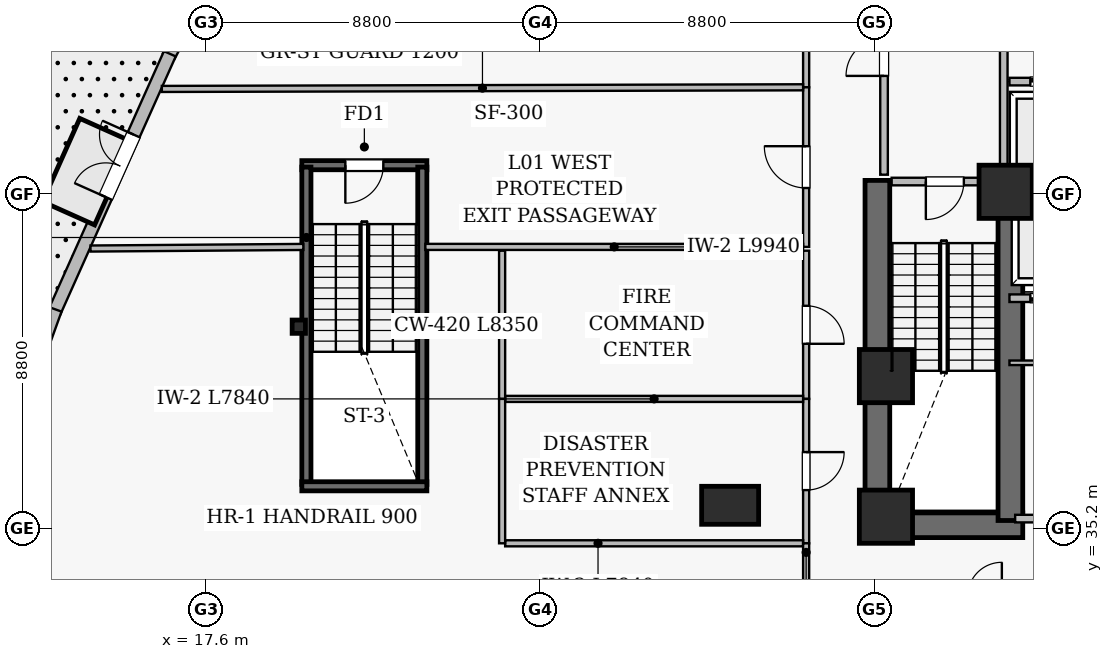
"""IFC4 building model, lengths in metres.
Left out: names, types, materials, properties, quantities, classifications, styles, units other than length and angle.
Written with IfcOpenShell. Run it as: python <this file> out.ifc"""

import sys

from ifc_helpers import new_model, si_unit, direction, frame, frame_2d, origin, origin_2d, place, context, subcontext, project, spatial, rectangle, i_section, extrude, element, fill, save


model = new_model("IFC4")
c1 = context("Model", 3, precision=1e-05, world=origin(), true_north=direction((0.0, 1.0)))
c2 = subcontext(c1, "Body", "Model", "MODEL_VIEW")
j1 = project(units=[si_unit("LENGTHUNIT", "METRE"), si_unit("PLANEANGLEUNIT", "RADIAN")], contexts=[c1])
p1 = place(None, origin())
s1 = spatial("IfcSite", under=j1, at=p1, CompositionType="ELEMENT")
p2 = place(p1, origin())
s2 = spatial("IfcBuilding", under=s1, at=p2, CompositionType="ELEMENT")
p3 = place(p2, origin())
s3 = spatial("IfcBuildingStorey", under=s2, at=p3, CompositionType="ELEMENT", Elevation=0.0)
p4 = place(p3, frame((34.95, 35.275, 0.0), z_axis=(0.0, 0.0, 1.0), x_axis=(1.0, 0.0, 0.0)))
e1 = element("IfcWall", 1, at=p4, inside=s3, PredefinedType="SHEAR", context=c2, shape_type="SweptSolid", body=[
    extrude(rectangle(XDim=4.15, YDim=0.65, at=frame_2d((2.075, 0.0))), origin(), (0.0, 0.0, 1.0), 4.5),
])
p5 = place(p3, frame((35.275, 34.95, 0.0), z_axis=(0.0, 0.0, 1.0), x_axis=(0.0, 1.0, 0.0)))
e2 = element("IfcWall", 2, at=p5, inside=s3, PredefinedType="SHEAR", context=c2, shape_type="SweptSolid", body=[
    extrude(rectangle(XDim=9.4, YDim=0.65, at=frame_2d((4.7, 0.0))), origin(), (0.0, 0.0, 1.0), 4.5),
])
p6 = place(p3, frame((38.775, 35.4, 0.0), z_axis=(0.0, 0.0, 1.0), x_axis=(0.0, 1.0, 0.0)))
e3 = element("IfcWall", 3, at=p6, inside=s3, PredefinedType="SHEAR", context=c2, shape_type="SweptSolid", body=[
    extrude(rectangle(XDim=8.95, YDim=0.65, at=frame_2d((4.475, 0.0))), origin(), (0.0, 0.0, 1.0), 4.5),
])
p7 = place(p3, frame((38.75, 44.05, 0.0), z_axis=(0.0, 0.0, 1.0), x_axis=(1.0, 0.0, 0.0)))
e4 = element("IfcWall", 4, at=p7, inside=s3, PredefinedType="SHEAR", context=c2, shape_type="SweptSolid", body=[
    extrude(rectangle(XDim=4.2, YDim=0.4, at=frame_2d((2.1, 0.0))), origin(), (0.0, 0.0, 1.0), 4.5),
])
for number, where, z_axis, x_axis in (
    (5, (35.5, 35.5, 0.0), (0.0, 0.0, 1.0), (1.0, 0.0, 0.0)),
    (6, (38.65, 44.05, 0.0), (0.0, 0.0, 1.0), (1.0, 0.0, 0.0)),
    (7, (35.5, 39.2, 0.0), (0.0, 0.0, 1.0), (1.0, 0.0, 0.0)),
):
    element("IfcColumn", number, at=place(p3, frame(where, z_axis=z_axis, x_axis=x_axis)), inside=s3, PredefinedType="COLUMN", context=c2, shape_type="SweptSolid", body=[
        extrude(rectangle(XDim=1.4, YDim=1.4, at=origin_2d()), origin(), (0.0, 0.0, 1.0), 4.8),
    ])
p8 = place(p3, frame((31.4, 35.8, 0.0), z_axis=(0.0, 0.0, 1.0), x_axis=(1.0, 0.0, 0.0)))
e8 = element("IfcColumn", 8, at=p8, inside=s3, PredefinedType="COLUMN", context=c2, shape_type="SweptSolid", body=[
    extrude(rectangle(XDim=1.5, YDim=1.0, at=origin_2d()), origin(), (0.0, 0.0, 1.0), 4.8),
])
p9 = place(p3, frame((20.05, 40.5, 0.0), z_axis=(0.0, 0.0, 1.0), x_axis=(1.0, 0.0, 0.0)))
e9 = element("IfcColumn", 9, at=p9, inside=s3, PredefinedType="PILASTER", context=c2, shape_type="SweptSolid", body=[
    extrude(i_section(OverallWidth=0.35, OverallDepth=0.35, WebThickness=0.012, FlangeThickness=0.019, FilletRadius=0.02, at=origin_2d()), origin(), (0.0, 0.0, 1.0), 4.8),
])
p10 = place(p3, frame((16.96, 48.239, 0.0), z_axis=(0.0, 0.0, 1.0), x_axis=(-0.474987965168, -0.879992291413, 0.0)))
e10 = element("IfcWall", 10, at=p10, inside=s3, PredefinedType="SOLIDWALL", context=c2, shape_type="SweptSolid", body=[
    extrude(rectangle(XDim=0.705, YDim=0.34, at=frame_2d((0.352, 0.0))), origin(), (0.0, 0.0, 1.0), 4.5),
])
p11 = place(p3, frame((16.656, 47.682, 0.0), z_axis=(0.0, 0.0, 1.0), x_axis=(-0.408068113154, -0.912951485582, 0.0)))
e11 = element("IfcWall", 11, at=p11, inside=s3, PredefinedType="SOLIDWALL", context=c2, shape_type="SweptSolid", body=[
    extrude(rectangle(XDim=7.439, YDim=0.34, at=frame_2d((3.719, 0.0))), origin(), (0.0, 0.0, 1.0), 4.5),
])
p12 = place(p11, frame((2.33, 0.0, 0.0)))
e12 = element("IfcOpeningElement", 12, at=p12, cuts=e11, PredefinedType="OPENING", context=c2, shape_type="SweptSolid", body=[
    extrude(rectangle(XDim=1.8, YDim=2.25, at=frame_2d((0.9, 1.125))), frame((0.0, 0.18, 0.0), z_axis=(0.0, -1.0, 0.0), x_axis=(1.0, 0.0, 0.0)), (0.0, 0.0, 1.0), 0.36),
])
p13 = place(p3, frame((13.647, 40.955, 0.0), z_axis=(0.0, 0.0, 1.0), x_axis=(-0.340123865441, -0.940380644291, 0.0)))
e13 = element("IfcWall", 13, at=p13, inside=s3, PredefinedType="SOLIDWALL", context=c2, shape_type="SweptSolid", body=[
    extrude(rectangle(XDim=7.52, YDim=0.34, at=frame_2d((3.76, 0.0))), origin(), (0.0, 0.0, 1.0), 4.5),
])
p14 = place(p13, frame((2.86, 0.0, 0.0)))
e14 = element("IfcOpeningElement", 14, at=p14, cuts=e13, PredefinedType="OPENING", context=c2, shape_type="SweptSolid", body=[
    extrude(rectangle(XDim=1.8, YDim=2.25, at=frame_2d((0.9, 1.125))), frame((0.0, 0.18, 0.0), z_axis=(0.0, -1.0, 0.0), x_axis=(1.0, 0.0, 0.0)), (0.0, 0.0, 1.0), 0.36),
])
p15 = place(p3, frame((20.13, 44.75, 0.0), z_axis=(0.0, 0.0, 1.0), x_axis=(1.0, 0.0, 0.0)))
e15 = element("IfcWall", 15, at=p15, inside=s3, PredefinedType="SHEAR", context=c2, shape_type="SweptSolid", body=[
    extrude(rectangle(XDim=3.29, YDim=0.24, at=frame_2d((1.645, 0.0))), origin(), (0.0, 0.0, 1.0), 4.5),
])
p16 = place(p15, frame((1.145, 0.0, 0.0)))
e16 = element("IfcOpeningElement", 16, at=p16, cuts=e15, PredefinedType="OPENING", context=c2, shape_type="SweptSolid", body=[
    extrude(rectangle(XDim=1.0, YDim=2.15, at=frame_2d((0.5, 1.075))), frame((0.0, 0.13, 0.0), z_axis=(0.0, -1.0, 0.0), x_axis=(1.0, 0.0, 0.0)), (0.0, 0.0, 1.0), 0.26),
])
for number, where, z_axis, x_axis in (
    (17, (20.25, 36.35, 0.0), (0.0, 0.0, 1.0), (0.0, 1.0, 0.0)),
    (18, (23.3, 36.35, 0.0), (0.0, 0.0, 1.0), (0.0, 1.0, 0.0)),
):
    element("IfcWall", number, at=place(p3, frame(where, z_axis=z_axis, x_axis=x_axis)), inside=s3, PredefinedType="SHEAR", context=c2, shape_type="SweptSolid", body=[
        extrude(rectangle(XDim=8.35, YDim=0.24, at=frame_2d((4.175, 0.0))), origin(), (0.0, 0.0, 1.0), 4.5),
    ])
p17 = place(p3, frame((20.13, 36.3, 0.0), z_axis=(0.0, 0.0, 1.0), x_axis=(1.0, 0.0, 0.0)))
e19 = element("IfcWall", 19, at=p17, inside=s3, PredefinedType="SHEAR", context=c2, shape_type="SweptSolid", body=[
    extrude(rectangle(XDim=3.29, YDim=0.24, at=frame_2d((1.645, 0.0))), origin(), (0.0, 0.0, 1.0), 4.5),
])
p18 = place(p3, frame((38.9, 35.45, 0.0), z_axis=(0.0, 0.0, 1.0), x_axis=(1.0, 0.0, 0.0)))
e20 = element("IfcWall", 20, at=p18, inside=s3, PredefinedType="SOLIDWALL", context=c2, shape_type="SweptSolid", body=[
    extrude(rectangle(XDim=10.2, YDim=0.2, at=frame_2d((5.1, 0.0))), origin(), (0.0, 0.0, 1.0), 4.5),
])
p19 = place(p18, frame((4.6, 0.0, 0.0)))
e21 = element("IfcOpeningElement", 21, at=p19, cuts=e20, PredefinedType="OPENING", context=c2, shape_type="SweptSolid", body=[
    extrude(rectangle(XDim=1.0, YDim=2.15, at=frame_2d((0.5, 1.075))), frame((0.0, 0.11, 0.0), z_axis=(0.0, -1.0, 0.0), x_axis=(1.0, 0.0, 0.0)), (0.0, 0.0, 1.0), 0.22),
])
p20 = place(p3, frame((35.45, 44.5, 0.0), z_axis=(0.0, 0.0, 1.0), x_axis=(0.0, 1.0, 0.0)))
e22 = element("IfcWall", 22, at=p20, inside=s3, PredefinedType="SOLIDWALL", context=c2, shape_type="SweptSolid", body=[
    extrude(rectangle(XDim=7.92, YDim=0.2, at=frame_2d((3.96, 0.0))), origin(), (0.0, 0.0, 1.0), 4.5),
])
p21 = place(p20, frame((2.6, 0.0, 0.0)))
e23 = element("IfcOpeningElement", 23, at=p21, cuts=e22, PredefinedType="OPENING", context=c2, shape_type="SweptSolid", body=[
    extrude(rectangle(XDim=1.0, YDim=2.15, at=frame_2d((0.5, 1.075))), frame((0.0, 0.11, 0.0), z_axis=(0.0, -1.0, 0.0), x_axis=(1.0, 0.0, 0.0)), (0.0, 0.0, 1.0), 0.22),
])
p22 = place(p3, frame((38.6, 44.5, 0.0), z_axis=(0.0, 0.0, 1.0), x_axis=(0.0, 1.0, 0.0)))
e24 = element("IfcWall", 24, at=p22, inside=s3, PredefinedType="SOLIDWALL", context=c2, shape_type="SweptSolid", body=[
    extrude(rectangle(XDim=7.92, YDim=0.2, at=frame_2d((3.96, 0.0))), origin(), (0.0, 0.0, 1.0), 4.5),
])
p23 = place(p22, frame((3.425, 0.0, 0.0)))
e25 = element("IfcOpeningElement", 25, at=p23, cuts=e24, PredefinedType="OPENING", context=c2, shape_type="SweptSolid", body=[
    extrude(rectangle(XDim=0.95, YDim=2.15, at=frame_2d((0.475, 1.075))), frame((0.0, 0.11, 0.0), z_axis=(0.0, -1.0, 0.0), x_axis=(1.0, 0.0, 0.0)), (0.0, 0.0, 1.0), 0.22),
])
p24 = place(p3, frame((33.4, 54.6, 0.0), z_axis=(0.0, 0.0, 1.0), x_axis=(0.0, -1.0, 0.0)))
e26 = element("IfcWall", 26, at=p24, inside=s3, PredefinedType="SOLIDWALL", context=c2, shape_type="SweptSolid", body=[
    extrude(rectangle(XDim=7.8, YDim=0.16, at=frame_2d((3.9, 0.0))), origin(), (0.0, 0.0, 1.0), 3.9),
])
p25 = place(p24, frame((2.63, 0.0, 0.0)))
e27 = element("IfcOpeningElement", 27, at=p25, cuts=e26, PredefinedType="OPENING", context=c2, shape_type="SweptSolid", body=[
    extrude(rectangle(XDim=1.1, YDim=2.15, at=frame_2d((0.55, 1.075))), frame((0.0, 0.09, 0.0), z_axis=(0.0, -1.0, 0.0), x_axis=(1.0, 0.0, 0.0)), (0.0, 0.0, 1.0), 0.18),
])
p26 = place(p3, frame((38.75, 46.95, 0.0), z_axis=(0.0, 0.0, 1.0), x_axis=(1.0, 0.0, 0.0)))
e28 = element("IfcWall", 28, at=p26, inside=s3, PredefinedType="SOLIDWALL", context=c2, shape_type="SweptSolid", body=[
    extrude(rectangle(XDim=4.33, YDim=0.2, at=frame_2d((2.165, 0.0))), origin(), (0.0, 0.0, 1.0), 4.5),
])
p27 = place(p26, frame((0.55, 0.0, 0.0)))
e29 = element("IfcOpeningElement", 29, at=p27, cuts=e28, PredefinedType="OPENING", context=c2, shape_type="SweptSolid", body=[
    extrude(rectangle(XDim=1.0, YDim=2.15, at=frame_2d((0.5, 1.075))), frame((0.0, 0.11, 0.0), z_axis=(0.0, -1.0, 0.0), x_axis=(1.0, 0.0, 0.0)), (0.0, 0.0, 1.0), 0.22),
])
p28 = place(p26, frame((2.75, 0.0, 0.0)))
e30 = element("IfcOpeningElement", 30, at=p28, cuts=e28, PredefinedType="OPENING", context=c2, shape_type="SweptSolid", body=[
    extrude(rectangle(XDim=1.0, YDim=2.15, at=frame_2d((0.5, 1.075))), frame((0.0, 0.11, 0.0), z_axis=(0.0, -1.0, 0.0), x_axis=(1.0, 0.0, 0.0)), (0.0, 0.0, 1.0), 0.22),
])
p29 = place(p3, frame((38.75, 41.25, 0.0), z_axis=(0.0, 0.0, 1.0), x_axis=(1.0, 0.0, 0.0)))
e31 = element("IfcWall", 31, at=p29, inside=s3, PredefinedType="SOLIDWALL", context=c2, shape_type="SweptSolid", body=[
    extrude(rectangle(XDim=4.33, YDim=0.2, at=frame_2d((2.165, 0.0))), origin(), (0.0, 0.0, 1.0), 4.5),
])
p30 = place(p29, frame((0.55, 0.0, 0.0)))
e32 = element("IfcOpeningElement", 32, at=p30, cuts=e31, PredefinedType="OPENING", context=c2, shape_type="SweptSolid", body=[
    extrude(rectangle(XDim=1.0, YDim=2.15, at=frame_2d((0.5, 1.075))), frame((0.0, 0.11, 0.0), z_axis=(0.0, -1.0, 0.0), x_axis=(1.0, 0.0, 0.0)), (0.0, 0.0, 1.0), 0.22),
])
p31 = place(p29, frame((2.75, 0.0, 0.0)))
e33 = element("IfcOpeningElement", 33, at=p31, cuts=e31, PredefinedType="OPENING", context=c2, shape_type="SweptSolid", body=[
    extrude(rectangle(XDim=1.0, YDim=2.15, at=frame_2d((0.5, 1.075))), frame((0.0, 0.11, 0.0), z_axis=(0.0, -1.0, 0.0), x_axis=(1.0, 0.0, 0.0)), (0.0, 0.0, 1.0), 0.22),
])
p32 = place(p3, frame((38.75, 39.55, 0.0), z_axis=(0.0, 0.0, 1.0), x_axis=(1.0, 0.0, 0.0)))
e34 = element("IfcWall", 34, at=p32, inside=s3, PredefinedType="PARTITIONING", context=c2, shape_type="SweptSolid", body=[
    extrude(rectangle(XDim=4.33, YDim=0.12, at=frame_2d((2.165, 0.0))), origin(), (0.0, 0.0, 1.0), 4.5),
])
p33 = place(p32, frame((1.69, 0.0, 0.0)))
e35 = element("IfcOpeningElement", 35, at=p33, cuts=e34, PredefinedType="OPENING", context=c2, shape_type="SweptSolid", body=[
    extrude(rectangle(XDim=0.92, YDim=2.1, at=frame_2d((0.46, 1.05))), frame((0.0, 0.07, 0.0), z_axis=(0.0, -1.0, 0.0), x_axis=(1.0, 0.0, 0.0)), (0.0, 0.0, 1.0), 0.14),
])
p34 = place(p3, frame((33.4, 46.8, 0.0), z_axis=(0.0, 0.0, 1.0), x_axis=(0.0, -1.0, 0.0)))
e36 = element("IfcWall", 36, at=p34, inside=s3, PredefinedType="SOLIDWALL", context=c2, shape_type="SweptSolid", body=[
    extrude(rectangle(XDim=4.2, YDim=0.16, at=frame_2d((2.1, 0.0))), origin(), (0.0, 0.0, 1.0), 3.738),
])
p35 = place(p34, frame((1.55, 0.0, 0.0)))
e37 = element("IfcOpeningElement", 37, at=p35, cuts=e36, PredefinedType="OPENING", context=c2, shape_type="SweptSolid", body=[
    extrude(rectangle(XDim=1.1, YDim=2.15, at=frame_2d((0.55, 1.075))), frame((0.0, 0.09, 0.0), z_axis=(0.0, -1.0, 0.0), x_axis=(1.0, 0.0, 0.0)), (0.0, 0.0, 1.0), 0.18),
])
p36 = place(p3, frame((33.4, 42.5, 0.0), z_axis=(0.0, 0.0, 1.0), x_axis=(0.0, -1.0, 0.0)))
e38 = element("IfcWall", 38, at=p36, inside=s3, PredefinedType="SOLIDWALL", context=c2, shape_type="SweptSolid", body=[
    extrude(rectangle(XDim=3.9, YDim=0.16, at=frame_2d((1.95, 0.0))), origin(), (0.0, 0.0, 1.0), 4.5),
])
p37 = place(p36, frame((1.45, 0.0, 0.0)))
e39 = element("IfcOpeningElement", 39, at=p37, cuts=e38, PredefinedType="OPENING", context=c2, shape_type="SweptSolid", body=[
    extrude(rectangle(XDim=1.0, YDim=2.15, at=frame_2d((0.5, 1.075))), frame((0.0, 0.09, 0.0), z_axis=(0.0, -1.0, 0.0), x_axis=(1.0, 0.0, 0.0)), (0.0, 0.0, 1.0), 0.18),
])
p38 = place(p3, frame((33.4, 38.6, 0.0), z_axis=(0.0, 0.0, 1.0), x_axis=(0.0, -1.0, 0.0)))
e40 = element("IfcWall", 40, at=p38, inside=s3, PredefinedType="SOLIDWALL", context=c2, shape_type="SweptSolid", body=[
    extrude(rectangle(XDim=3.8, YDim=0.16, at=frame_2d((1.9, 0.0))), origin(), (0.0, 0.0, 1.0), 3.9),
])
p39 = place(p38, frame((1.4, 0.0, 0.0)))
e41 = element("IfcOpeningElement", 41, at=p39, cuts=e40, PredefinedType="OPENING", context=c2, shape_type="SweptSolid", body=[
    extrude(rectangle(XDim=1.0, YDim=2.15, at=frame_2d((0.5, 1.075))), frame((0.0, 0.09, 0.0), z_axis=(0.0, -1.0, 0.0), x_axis=(1.0, 0.0, 0.0)), (0.0, 0.0, 1.0), 0.18),
])
p40 = place(p3, frame((35.65, 44.32, 0.0), z_axis=(0.0, 0.0, 1.0), x_axis=(1.0, 0.0, 0.0)))
e42 = element("IfcWall", 42, at=p40, inside=s3, PredefinedType="SOLIDWALL", context=c2, shape_type="SweptSolid", body=[
    extrude(rectangle(XDim=2.8, YDim=0.2, at=frame_2d((1.4, 0.0))), origin(), (0.0, 0.0, 1.0), 4.5),
])
p41 = place(p40, frame((0.9, 0.0, 0.0)))
e43 = element("IfcOpeningElement", 43, at=p41, cuts=e42, PredefinedType="OPENING", context=c2, shape_type="SweptSolid", body=[
    extrude(rectangle(XDim=1.0, YDim=2.15, at=frame_2d((0.5, 1.075))), frame((0.0, 0.11, 0.0), z_axis=(0.0, -1.0, 0.0), x_axis=(1.0, 0.0, 0.0)), (0.0, 0.0, 1.0), 0.22),
])
p42 = place(p3, frame((33.32, 46.8, 0.0), z_axis=(0.0, 0.0, 1.0), x_axis=(-0.999996757828, -0.002546435404, 0.0)))
e44 = element("IfcWall", 44, at=p42, inside=s3, PredefinedType="SOLIDWALL", context=c2, shape_type="SweptSolid", body=[
    extrude(rectangle(XDim=16.874, YDim=0.16, at=frame_2d((8.437, 0.0))), origin(), (0.0, 0.0, 1.0), 3.738),
])
p43 = place(p3, frame((23.38, 42.6, 0.0), z_axis=(0.0, 0.0, 1.0), x_axis=(1.0, 0.0, 0.0)))
e45 = element("IfcWall", 45, at=p43, inside=s3, PredefinedType="SOLIDWALL", context=c2, shape_type="SweptSolid", body=[
    extrude(rectangle(XDim=9.94, YDim=0.16, at=frame_2d((4.97, 0.0))), origin(), (0.0, 0.0, 1.0), 3.9),
])
p44 = place(p3, frame((25.48, 38.6, 0.0), z_axis=(0.0, 0.0, 1.0), x_axis=(1.0, 0.0, 0.0)))
e46 = element("IfcWall", 46, at=p44, inside=s3, PredefinedType="SOLIDWALL", context=c2, shape_type="SweptSolid", body=[
    extrude(rectangle(XDim=7.84, YDim=0.16, at=frame_2d((3.92, 0.0))), origin(), (0.0, 0.0, 1.0), 3.9),
])
p45 = place(p3, frame((25.48, 34.8, 0.0), z_axis=(0.0, 0.0, 1.0), x_axis=(1.0, 0.0, 0.0)))
e47 = element("IfcWall", 47, at=p45, inside=s3, PredefinedType="SOLIDWALL", context=c2, shape_type="SweptSolid", body=[
    extrude(rectangle(XDim=7.84, YDim=0.16, at=frame_2d((3.92, 0.0))), origin(), (0.0, 0.0, 1.0), 3.688),
])
p46 = place(p3, frame((14.569, 42.557, 0.0), z_axis=(0.0, 0.0, 1.0), x_axis=(0.999971567241, 0.007540869236, 0.0)))
e48 = element("IfcWall", 48, at=p46, inside=s3, PredefinedType="SOLIDWALL", context=c2, shape_type="SweptSolid", body=[
    extrude(rectangle(XDim=5.601, YDim=0.16, at=frame_2d((2.801, 0.0))), origin(), (0.0, 0.0, 1.0), 4.5),
])
p47 = place(p3, frame((25.4, 42.5, 0.0), z_axis=(0.0, 0.0, 1.0), x_axis=(0.0, -1.0, 0.0)))
e49 = element("IfcWall", 49, at=p47, inside=s3, PredefinedType="SOLIDWALL", context=c2, shape_type="SweptSolid", body=[
    extrude(rectangle(XDim=3.9, YDim=0.16, at=frame_2d((1.95, 0.0))), origin(), (0.0, 0.0, 1.0), 4.5),
])
p48 = place(p3, frame((25.4, 38.6, 0.0), z_axis=(0.0, 0.0, 1.0), x_axis=(0.0, -1.0, 0.0)))
e50 = element("IfcWall", 50, at=p48, inside=s3, PredefinedType="SOLIDWALL", context=c2, shape_type="SweptSolid", body=[
    extrude(rectangle(XDim=3.8, YDim=0.16, at=frame_2d((1.9, 0.0))), origin(), (0.0, 0.0, 1.0), 4.5),
])
p49 = place(p3, frame((33.4, 34.8, 0.0), z_axis=(0.0, 0.0, 1.0), x_axis=(0.0, -1.0, 0.0)))
e51 = element("IfcWall", 51, at=p49, inside=s3, PredefinedType="SOLIDWALL", context=c2, shape_type="SweptSolid", body=[
    extrude(rectangle(XDim=1.4, YDim=0.16, at=frame_2d((0.7, 0.0))), origin(), (0.0, 0.0, 1.0), 4.5),
])
p50 = place(p12, frame((1.8, 0.0, 0.0), z_axis=(0.0, 0.0, 1.0), x_axis=(-1.0, 0.0, 0.0)))
e52 = element("IfcDoor", 52, at=p50, inside=s3, OperationType="DOUBLE_DOOR_SINGLE_SWING", PredefinedType="DOOR", context=c2, shape_type="SweptSolid", body=[
    extrude(rectangle(XDim=1.8, YDim=2.25, at=frame_2d((0.9, 1.125))), frame((0.0, 0.025, 0.0), z_axis=(0.0, -1.0, 0.0), x_axis=(1.0, 0.0, 0.0)), (0.0, 0.0, 1.0), 0.05),
])
fill(e12, e52)
p51 = place(p16, frame((1.0, 0.0, 0.0), z_axis=(0.0, 0.0, 1.0), x_axis=(-1.0, 0.0, 0.0)))
e53 = element("IfcDoor", 53, at=p51, inside=s3, OperationType="SINGLE_SWING_LEFT", PredefinedType="DOOR", context=c2, shape_type="SweptSolid", body=[
    extrude(rectangle(XDim=1.0, YDim=2.15, at=frame_2d((0.5, 1.075))), frame((0.0, 0.025, 0.0), z_axis=(0.0, -1.0, 0.0), x_axis=(1.0, 0.0, 0.0)), (0.0, 0.0, 1.0), 0.05),
])
fill(e16, e53)
p52 = place(p41, frame((1.0, 0.0, 0.0), z_axis=(0.0, 0.0, 1.0), x_axis=(-1.0, 0.0, 0.0)))
e54 = element("IfcDoor", 54, at=p52, inside=s3, OperationType="SINGLE_SWING_LEFT", PredefinedType="DOOR", context=c2, shape_type="SweptSolid", body=[
    extrude(rectangle(XDim=1.0, YDim=2.15, at=frame_2d((0.5, 1.075))), frame((0.0, 0.025, 0.0), z_axis=(0.0, -1.0, 0.0), x_axis=(1.0, 0.0, 0.0)), (0.0, 0.0, 1.0), 0.05),
])
fill(e43, e54)
p53 = place(p21, origin())
e55 = element("IfcDoor", 55, at=p53, inside=s3, OperationType="SINGLE_SWING_LEFT", PredefinedType="DOOR", context=c2, shape_type="SweptSolid", body=[
    extrude(rectangle(XDim=1.0, YDim=2.15, at=frame_2d((0.5, 1.075))), frame((0.0, 0.025, 0.0), z_axis=(0.0, -1.0, 0.0), x_axis=(1.0, 0.0, 0.0)), (0.0, 0.0, 1.0), 0.05),
])
fill(e23, e55)
p54 = place(p27, origin())
e56 = element("IfcDoor", 56, at=p54, inside=s3, OperationType="SLIDING_TO_LEFT", PredefinedType="DOOR", context=c2, shape_type="SweptSolid", body=[
    extrude(rectangle(XDim=1.0, YDim=2.15, at=frame_2d((0.5, 1.075))), frame((0.0, 0.025, 0.0), z_axis=(0.0, -1.0, 0.0), x_axis=(1.0, 0.0, 0.0)), (0.0, 0.0, 1.0), 0.05),
])
fill(e29, e56)
p55 = place(p30, frame((1.0, 0.0, 0.0), z_axis=(0.0, 0.0, 1.0), x_axis=(-1.0, 0.0, 0.0)))
e57 = element("IfcDoor", 57, at=p55, inside=s3, OperationType="SLIDING_TO_LEFT", PredefinedType="DOOR", context=c2, shape_type="SweptSolid", body=[
    extrude(rectangle(XDim=1.0, YDim=2.15, at=frame_2d((0.5, 1.075))), frame((0.0, 0.025, 0.0), z_axis=(0.0, -1.0, 0.0), x_axis=(1.0, 0.0, 0.0)), (0.0, 0.0, 1.0), 0.05),
])
fill(e32, e57)
p56 = place(p35, frame((1.1, 0.0, 0.0), z_axis=(0.0, 0.0, 1.0), x_axis=(-1.0, 0.0, 0.0)))
e58 = element("IfcDoor", 58, at=p56, inside=s3, OperationType="SINGLE_SWING_LEFT", PredefinedType="DOOR", context=c2, shape_type="SweptSolid", body=[
    extrude(rectangle(XDim=1.1, YDim=2.15, at=frame_2d((0.55, 1.075))), frame((0.0, 0.025, 0.0), z_axis=(0.0, -1.0, 0.0), x_axis=(1.0, 0.0, 0.0)), (0.0, 0.0, 1.0), 0.05),
])
fill(e37, e58)
p57 = place(p37, origin())
e59 = element("IfcDoor", 59, at=p57, inside=s3, OperationType="SINGLE_SWING_RIGHT", PredefinedType="DOOR", context=c2, shape_type="SweptSolid", body=[
    extrude(rectangle(XDim=1.0, YDim=2.15, at=frame_2d((0.5, 1.075))), frame((0.0, 0.025, 0.0), z_axis=(0.0, -1.0, 0.0), x_axis=(1.0, 0.0, 0.0)), (0.0, 0.0, 1.0), 0.05),
])
fill(e39, e59)
p58 = place(p39, origin())
e60 = element("IfcDoor", 60, at=p58, inside=s3, OperationType="SINGLE_SWING_LEFT", PredefinedType="DOOR", context=c2, shape_type="SweptSolid", body=[
    extrude(rectangle(XDim=1.0, YDim=2.15, at=frame_2d((0.5, 1.075))), frame((0.0, 0.025, 0.0), z_axis=(0.0, -1.0, 0.0), x_axis=(1.0, 0.0, 0.0)), (0.0, 0.0, 1.0), 0.05),
])
fill(e41, e60)
save(model, sys.argv[1])
